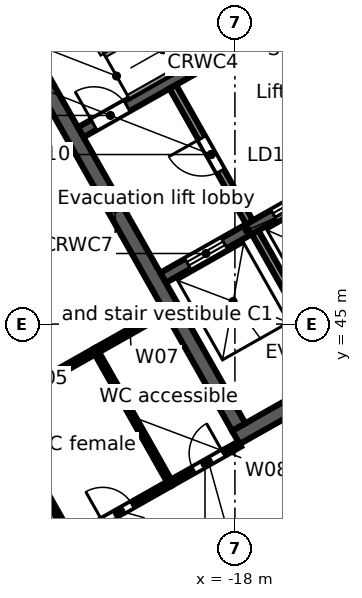
"""IFC4 building model, lengths in metres.
Left out: names, types, materials, properties, quantities, classifications, styles, units other than length and angle.
Written with IfcOpenShell. Run it as: python <this file> out.ifc"""

import sys

from ifc_helpers import new_model, si_unit, direction, frame, frame_2d, origin, place, context, subcontext, project, spatial, rectangle, extrude, element, fill, save


model = new_model("IFC4")
c1 = context("Model", 3, precision=1e-05, world=origin(), true_north=direction((0.0, 1.0)))
c2 = subcontext(c1, "Body", "Model", "MODEL_VIEW")
j1 = project(units=[si_unit("LENGTHUNIT", "METRE"), si_unit("PLANEANGLEUNIT", "RADIAN")], contexts=[c1])
p1 = place(None, origin())
s1 = spatial("IfcSite", under=j1, at=p1, CompositionType="ELEMENT")
p2 = place(p1, origin())
s2 = spatial("IfcBuilding", under=s1, at=p2, CompositionType="ELEMENT")
p3 = place(p2, frame((0.0, 0.0, 308.3)))
s3 = spatial("IfcBuildingStorey", under=s2, at=p3, CompositionType="ELEMENT", Elevation=308.3)
p4 = place(p3, frame((-58.732, 38.771, 0.0), z_axis=(0.0, 0.0, 1.0), x_axis=(0.870355615581, 0.492423702137, 0.0)))
e1 = element("IfcWall", 1, at=p4, inside=s3, PredefinedType="STANDARD", context=c2, shape_type="SweptSolid", body=[
    extrude(rectangle(XDim=64.052, YDim=0.25, at=frame_2d((32.026, 0.0))), origin(), (0.0, 0.0, 1.0), 3.45),
])
p5 = place(p4, frame((61.259, 0.0, 0.8)))
e2 = element("IfcOpeningElement", 2, at=p5, cuts=e1, PredefinedType="OPENING", context=c2, shape_type="SweptSolid", body=[
    extrude(rectangle(XDim=2.4, YDim=2.2, at=frame_2d((1.2, 1.1))), frame((0.0, 0.135, 0.0), z_axis=(0.0, -1.0, 0.0), x_axis=(1.0, 0.0, 0.0)), (0.0, 0.0, 1.0), 0.27),
])
p6 = place(p4, frame((58.216, 0.0, 0.8)))
e3 = element("IfcOpeningElement", 3, at=p6, cuts=e1, PredefinedType="OPENING", context=c2, shape_type="SweptSolid", body=[
    extrude(rectangle(XDim=2.4, YDim=2.2, at=frame_2d((1.2, 1.1))), frame((0.0, 0.135, 0.0), z_axis=(0.0, -1.0, 0.0), x_axis=(1.0, 0.0, 0.0)), (0.0, 0.0, 1.0), 0.27),
])
p7 = place(p4, frame((55.173, 0.0, 0.8)))
e4 = element("IfcOpeningElement", 4, at=p7, cuts=e1, PredefinedType="OPENING", context=c2, shape_type="SweptSolid", body=[
    extrude(rectangle(XDim=2.4, YDim=2.2, at=frame_2d((1.2, 1.1))), frame((0.0, 0.135, 0.0), z_axis=(0.0, -1.0, 0.0), x_axis=(1.0, 0.0, 0.0)), (0.0, 0.0, 1.0), 0.27),
])
p8 = place(p4, frame((52.129, 0.0, 0.8)))
e5 = element("IfcOpeningElement", 5, at=p8, cuts=e1, PredefinedType="OPENING", context=c2, shape_type="SweptSolid", body=[
    extrude(rectangle(XDim=2.4, YDim=2.2, at=frame_2d((1.2, 1.1))), frame((0.0, 0.135, 0.0), z_axis=(0.0, -1.0, 0.0), x_axis=(1.0, 0.0, 0.0)), (0.0, 0.0, 1.0), 0.27),
])
p9 = place(p4, frame((49.086, 0.0, 0.8)))
e6 = element("IfcOpeningElement", 6, at=p9, cuts=e1, PredefinedType="OPENING", context=c2, shape_type="SweptSolid", body=[
    extrude(rectangle(XDim=2.4, YDim=2.2, at=frame_2d((1.2, 1.1))), frame((0.0, 0.135, 0.0), z_axis=(0.0, -1.0, 0.0), x_axis=(1.0, 0.0, 0.0)), (0.0, 0.0, 1.0), 0.27),
])
p10 = place(p4, frame((46.043, 0.0, 0.8)))
e7 = element("IfcOpeningElement", 7, at=p10, cuts=e1, PredefinedType="OPENING", context=c2, shape_type="SweptSolid", body=[
    extrude(rectangle(XDim=2.4, YDim=2.2, at=frame_2d((1.2, 1.1))), frame((0.0, 0.135, 0.0), z_axis=(0.0, -1.0, 0.0), x_axis=(1.0, 0.0, 0.0)), (0.0, 0.0, 1.0), 0.27),
])
p11 = place(p4, frame((43.0, 0.0, 0.8)))
e8 = element("IfcOpeningElement", 8, at=p11, cuts=e1, PredefinedType="OPENING", context=c2, shape_type="SweptSolid", body=[
    extrude(rectangle(XDim=2.4, YDim=2.2, at=frame_2d((1.2, 1.1))), frame((0.0, 0.135, 0.0), z_axis=(0.0, -1.0, 0.0), x_axis=(1.0, 0.0, 0.0)), (0.0, 0.0, 1.0), 0.27),
])
p12 = place(p4, frame((39.956, 0.0, 0.8)))
e9 = element("IfcOpeningElement", 9, at=p12, cuts=e1, PredefinedType="OPENING", context=c2, shape_type="SweptSolid", body=[
    extrude(rectangle(XDim=2.4, YDim=2.2, at=frame_2d((1.2, 1.1))), frame((0.0, 0.135, 0.0), z_axis=(0.0, -1.0, 0.0), x_axis=(1.0, 0.0, 0.0)), (0.0, 0.0, 1.0), 0.27),
])
p13 = place(p4, frame((36.913, 0.0, 0.8)))
e10 = element("IfcOpeningElement", 10, at=p13, cuts=e1, PredefinedType="OPENING", context=c2, shape_type="SweptSolid", body=[
    extrude(rectangle(XDim=2.4, YDim=2.2, at=frame_2d((1.2, 1.1))), frame((0.0, 0.135, 0.0), z_axis=(0.0, -1.0, 0.0), x_axis=(1.0, 0.0, 0.0)), (0.0, 0.0, 1.0), 0.27),
])
p14 = place(p4, frame((33.87, 0.0, 0.8)))
e11 = element("IfcOpeningElement", 11, at=p14, cuts=e1, PredefinedType="OPENING", context=c2, shape_type="SweptSolid", body=[
    extrude(rectangle(XDim=2.4, YDim=2.2, at=frame_2d((1.2, 1.1))), frame((0.0, 0.135, 0.0), z_axis=(0.0, -1.0, 0.0), x_axis=(1.0, 0.0, 0.0)), (0.0, 0.0, 1.0), 0.27),
])
p15 = place(p4, frame((30.826, 0.0, 0.8)))
e12 = element("IfcOpeningElement", 12, at=p15, cuts=e1, PredefinedType="OPENING", context=c2, shape_type="SweptSolid", body=[
    extrude(rectangle(XDim=2.4, YDim=2.2, at=frame_2d((1.2, 1.1))), frame((0.0, 0.135, 0.0), z_axis=(0.0, -1.0, 0.0), x_axis=(1.0, 0.0, 0.0)), (0.0, 0.0, 1.0), 0.27),
])
p16 = place(p4, frame((27.783, 0.0, 0.8)))
e13 = element("IfcOpeningElement", 13, at=p16, cuts=e1, PredefinedType="OPENING", context=c2, shape_type="SweptSolid", body=[
    extrude(rectangle(XDim=2.4, YDim=2.2, at=frame_2d((1.2, 1.1))), frame((0.0, 0.135, 0.0), z_axis=(0.0, -1.0, 0.0), x_axis=(1.0, 0.0, 0.0)), (0.0, 0.0, 1.0), 0.27),
])
p17 = place(p4, frame((24.74, 0.0, 0.8)))
e14 = element("IfcOpeningElement", 14, at=p17, cuts=e1, PredefinedType="OPENING", context=c2, shape_type="SweptSolid", body=[
    extrude(rectangle(XDim=2.4, YDim=2.2, at=frame_2d((1.2, 1.1))), frame((0.0, 0.135, 0.0), z_axis=(0.0, -1.0, 0.0), x_axis=(1.0, 0.0, 0.0)), (0.0, 0.0, 1.0), 0.27),
])
p18 = place(p4, frame((21.696, 0.0, 0.8)))
e15 = element("IfcOpeningElement", 15, at=p18, cuts=e1, PredefinedType="OPENING", context=c2, shape_type="SweptSolid", body=[
    extrude(rectangle(XDim=2.4, YDim=2.2, at=frame_2d((1.2, 1.1))), frame((0.0, 0.135, 0.0), z_axis=(0.0, -1.0, 0.0), x_axis=(1.0, 0.0, 0.0)), (0.0, 0.0, 1.0), 0.27),
])
p19 = place(p4, frame((18.653, 0.0, 0.8)))
e16 = element("IfcOpeningElement", 16, at=p19, cuts=e1, PredefinedType="OPENING", context=c2, shape_type="SweptSolid", body=[
    extrude(rectangle(XDim=2.4, YDim=2.2, at=frame_2d((1.2, 1.1))), frame((0.0, 0.135, 0.0), z_axis=(0.0, -1.0, 0.0), x_axis=(1.0, 0.0, 0.0)), (0.0, 0.0, 1.0), 0.27),
])
p20 = place(p4, frame((15.61, 0.0, 0.8)))
e17 = element("IfcOpeningElement", 17, at=p20, cuts=e1, PredefinedType="OPENING", context=c2, shape_type="SweptSolid", body=[
    extrude(rectangle(XDim=2.4, YDim=2.2, at=frame_2d((1.2, 1.1))), frame((0.0, 0.135, 0.0), z_axis=(0.0, -1.0, 0.0), x_axis=(1.0, 0.0, 0.0)), (0.0, 0.0, 1.0), 0.27),
])
p21 = place(p4, frame((12.567, 0.0, 0.8)))
e18 = element("IfcOpeningElement", 18, at=p21, cuts=e1, PredefinedType="OPENING", context=c2, shape_type="SweptSolid", body=[
    extrude(rectangle(XDim=2.4, YDim=2.2, at=frame_2d((1.2, 1.1))), frame((0.0, 0.135, 0.0), z_axis=(0.0, -1.0, 0.0), x_axis=(1.0, 0.0, 0.0)), (0.0, 0.0, 1.0), 0.27),
])
p22 = place(p4, frame((9.523, 0.0, 0.8)))
e19 = element("IfcOpeningElement", 19, at=p22, cuts=e1, PredefinedType="OPENING", context=c2, shape_type="SweptSolid", body=[
    extrude(rectangle(XDim=2.4, YDim=2.2, at=frame_2d((1.2, 1.1))), frame((0.0, 0.135, 0.0), z_axis=(0.0, -1.0, 0.0), x_axis=(1.0, 0.0, 0.0)), (0.0, 0.0, 1.0), 0.27),
])
p23 = place(p4, frame((6.48, 0.0, 0.8)))
e20 = element("IfcOpeningElement", 20, at=p23, cuts=e1, PredefinedType="OPENING", context=c2, shape_type="SweptSolid", body=[
    extrude(rectangle(XDim=2.4, YDim=2.2, at=frame_2d((1.2, 1.1))), frame((0.0, 0.135, 0.0), z_axis=(0.0, -1.0, 0.0), x_axis=(1.0, 0.0, 0.0)), (0.0, 0.0, 1.0), 0.27),
])
p24 = place(p4, frame((3.437, 0.0, 0.8)))
e21 = element("IfcOpeningElement", 21, at=p24, cuts=e1, PredefinedType="OPENING", context=c2, shape_type="SweptSolid", body=[
    extrude(rectangle(XDim=2.4, YDim=2.2, at=frame_2d((1.2, 1.1))), frame((0.0, 0.135, 0.0), z_axis=(0.0, -1.0, 0.0), x_axis=(1.0, 0.0, 0.0)), (0.0, 0.0, 1.0), 0.27),
])
p25 = place(p4, frame((0.393, 0.0, 0.8)))
e22 = element("IfcOpeningElement", 22, at=p25, cuts=e1, PredefinedType="OPENING", context=c2, shape_type="SweptSolid", body=[
    extrude(rectangle(XDim=2.4, YDim=2.2, at=frame_2d((1.2, 1.1))), frame((0.0, 0.135, 0.0), z_axis=(0.0, -1.0, 0.0), x_axis=(1.0, 0.0, 0.0)), (0.0, 0.0, 1.0), 0.27),
])
p26 = place(p3, frame((-3.017, 46.293, 0.0), z_axis=(0.0, 0.0, 1.0), x_axis=(-0.870355474887, -0.492423950812, 0.0)))
e23 = element("IfcWall", 23, at=p26, inside=s3, PredefinedType="STANDARD", context=c2, shape_type="SweptSolid", body=[
    extrude(rectangle(XDim=40.34, YDim=0.25, at=frame_2d((20.17, 0.0))), origin(), (0.0, 0.0, 1.0), 3.45),
])
p27 = place(p26, frame((37.428, 0.0, 0.8)))
e24 = element("IfcOpeningElement", 24, at=p27, cuts=e23, PredefinedType="OPENING", context=c2, shape_type="SweptSolid", body=[
    extrude(rectangle(XDim=2.4, YDim=2.2, at=frame_2d((1.2, 1.1))), frame((0.0, 0.135, 0.0), z_axis=(0.0, -1.0, 0.0), x_axis=(1.0, 0.0, 0.0)), (0.0, 0.0, 1.0), 0.27),
])
p28 = place(p26, frame((34.372, 0.0, 0.0)))
e25 = element("IfcOpeningElement", 25, at=p28, cuts=e23, PredefinedType="OPENING", context=c2, shape_type="SweptSolid", body=[
    extrude(rectangle(XDim=1.8, YDim=2.4, at=frame_2d((0.9, 1.2))), frame((0.0, 0.135, 0.0), z_axis=(0.0, -1.0, 0.0), x_axis=(1.0, 0.0, 0.0)), (0.0, 0.0, 1.0), 0.27),
])
p29 = place(p26, frame((30.716, 0.0, 0.8)))
e26 = element("IfcOpeningElement", 26, at=p29, cuts=e23, PredefinedType="OPENING", context=c2, shape_type="SweptSolid", body=[
    extrude(rectangle(XDim=2.4, YDim=2.2, at=frame_2d((1.2, 1.1))), frame((0.0, 0.135, 0.0), z_axis=(0.0, -1.0, 0.0), x_axis=(1.0, 0.0, 0.0)), (0.0, 0.0, 1.0), 0.27),
])
p30 = place(p26, frame((27.36, 0.0, 0.8)))
e27 = element("IfcOpeningElement", 27, at=p30, cuts=e23, PredefinedType="OPENING", context=c2, shape_type="SweptSolid", body=[
    extrude(rectangle(XDim=2.4, YDim=2.2, at=frame_2d((1.2, 1.1))), frame((0.0, 0.135, 0.0), z_axis=(0.0, -1.0, 0.0), x_axis=(1.0, 0.0, 0.0)), (0.0, 0.0, 1.0), 0.27),
])
p31 = place(p26, frame((24.304, 0.0, 0.0)))
e28 = element("IfcOpeningElement", 28, at=p31, cuts=e23, PredefinedType="OPENING", context=c2, shape_type="SweptSolid", body=[
    extrude(rectangle(XDim=1.8, YDim=2.4, at=frame_2d((0.9, 1.2))), frame((0.0, 0.135, 0.0), z_axis=(0.0, -1.0, 0.0), x_axis=(1.0, 0.0, 0.0)), (0.0, 0.0, 1.0), 0.27),
])
p32 = place(p26, frame((20.648, 0.0, 0.8)))
e29 = element("IfcOpeningElement", 29, at=p32, cuts=e23, PredefinedType="OPENING", context=c2, shape_type="SweptSolid", body=[
    extrude(rectangle(XDim=2.4, YDim=2.2, at=frame_2d((1.2, 1.1))), frame((0.0, 0.135, 0.0), z_axis=(0.0, -1.0, 0.0), x_axis=(1.0, 0.0, 0.0)), (0.0, 0.0, 1.0), 0.27),
])
p33 = place(p26, frame((17.292, 0.0, 0.8)))
e30 = element("IfcOpeningElement", 30, at=p33, cuts=e23, PredefinedType="OPENING", context=c2, shape_type="SweptSolid", body=[
    extrude(rectangle(XDim=2.4, YDim=2.2, at=frame_2d((1.2, 1.1))), frame((0.0, 0.135, 0.0), z_axis=(0.0, -1.0, 0.0), x_axis=(1.0, 0.0, 0.0)), (0.0, 0.0, 1.0), 0.27),
])
p34 = place(p26, frame((14.236, 0.0, 0.0)))
e31 = element("IfcOpeningElement", 31, at=p34, cuts=e23, PredefinedType="OPENING", context=c2, shape_type="SweptSolid", body=[
    extrude(rectangle(XDim=1.8, YDim=2.4, at=frame_2d((0.9, 1.2))), frame((0.0, 0.135, 0.0), z_axis=(0.0, -1.0, 0.0), x_axis=(1.0, 0.0, 0.0)), (0.0, 0.0, 1.0), 0.27),
])
p35 = place(p26, frame((10.58, 0.0, 0.8)))
e32 = element("IfcOpeningElement", 32, at=p35, cuts=e23, PredefinedType="OPENING", context=c2, shape_type="SweptSolid", body=[
    extrude(rectangle(XDim=2.4, YDim=2.2, at=frame_2d((1.2, 1.1))), frame((0.0, 0.135, 0.0), z_axis=(0.0, -1.0, 0.0), x_axis=(1.0, 0.0, 0.0)), (0.0, 0.0, 1.0), 0.27),
])
p36 = place(p26, frame((7.224, 0.0, 0.8)))
e33 = element("IfcOpeningElement", 33, at=p36, cuts=e23, PredefinedType="OPENING", context=c2, shape_type="SweptSolid", body=[
    extrude(rectangle(XDim=2.4, YDim=2.2, at=frame_2d((1.2, 1.1))), frame((0.0, 0.135, 0.0), z_axis=(0.0, -1.0, 0.0), x_axis=(1.0, 0.0, 0.0)), (0.0, 0.0, 1.0), 0.27),
])
p37 = place(p26, frame((4.168, 0.0, 0.0)))
e34 = element("IfcOpeningElement", 34, at=p37, cuts=e23, PredefinedType="OPENING", context=c2, shape_type="SweptSolid", body=[
    extrude(rectangle(XDim=1.8, YDim=2.4, at=frame_2d((0.9, 1.2))), frame((0.0, 0.135, 0.0), z_axis=(0.0, -1.0, 0.0), x_axis=(1.0, 0.0, 0.0)), (0.0, 0.0, 1.0), 0.27),
])
p38 = place(p26, frame((0.512, 0.0, 0.8)))
e35 = element("IfcOpeningElement", 35, at=p38, cuts=e23, PredefinedType="OPENING", context=c2, shape_type="SweptSolid", body=[
    extrude(rectangle(XDim=2.4, YDim=2.2, at=frame_2d((1.2, 1.1))), frame((0.0, 0.135, 0.0), z_axis=(0.0, -1.0, 0.0), x_axis=(1.0, 0.0, 0.0)), (0.0, 0.0, 1.0), 0.27),
])
p39 = place(p3, frame((-17.975, 42.017, 0.0), z_axis=(0.0, 0.0, 1.0), x_axis=(0.87034965173, 0.492434243055, 0.0)))
e36 = element("IfcWall", 36, at=p39, inside=s3, PredefinedType="SOLIDWALL", context=c2, shape_type="SweptSolid", body=[
    extrude(rectangle(XDim=15.0, YDim=0.4, at=frame_2d((7.5, 0.0))), origin(), (0.0, 0.0, 1.0), 3.45),
])
p40 = place(p39, frame((6.1, 0.0, 0.0)))
e37 = element("IfcOpeningElement", 37, at=p40, cuts=e36, PredefinedType="OPENING", context=c2, shape_type="SweptSolid", body=[
    extrude(rectangle(XDim=1.2, YDim=2.1, at=frame_2d((0.6, 1.05))), frame((0.0, 0.21, 0.0), z_axis=(0.0, -1.0, 0.0), x_axis=(1.0, 0.0, 0.0)), (0.0, 0.0, 1.0), 0.42),
])
p41 = place(p3, frame((-19.892, 46.218, 0.0), z_axis=(0.0, 0.0, 1.0), x_axis=(0.870341639186, 0.492448404505, 0.0)))
e38 = element("IfcWall", 38, at=p41, inside=s3, PredefinedType="SOLIDWALL", context=c2, shape_type="SweptSolid", body=[
    extrude(rectangle(XDim=5.1, YDim=0.3, at=frame_2d((2.55, 0.0))), origin(), (0.0, 0.0, 1.0), 3.45),
])
p42 = place(p41, frame((0.75, 0.0, 0.0)))
e39 = element("IfcOpeningElement", 39, at=p42, cuts=e38, PredefinedType="OPENING", context=c2, shape_type="SweptSolid", body=[
    extrude(rectangle(XDim=1.1, YDim=2.1, at=frame_2d((0.55, 1.05))), frame((0.0, 0.16, 0.0), z_axis=(0.0, -1.0, 0.0), x_axis=(1.0, 0.0, 0.0)), (0.0, 0.0, 1.0), 0.32),
])
p43 = place(p41, frame((3.35, 0.0, 0.0)))
e40 = element("IfcOpeningElement", 40, at=p43, cuts=e38, PredefinedType="OPENING", context=c2, shape_type="SweptSolid", body=[
    extrude(rectangle(XDim=1.1, YDim=2.1, at=frame_2d((0.55, 1.05))), frame((0.0, 0.16, 0.0), z_axis=(0.0, -1.0, 0.0), x_axis=(1.0, 0.0, 0.0)), (0.0, 0.0, 1.0), 0.32),
])
p44 = place(p3, frame((-22.059, 50.047, 0.0), z_axis=(0.0, 0.0, 1.0), x_axis=(0.87035077051, 0.49243226567, 0.0)))
e41 = element("IfcWall", 41, at=p44, inside=s3, PredefinedType="SOLIDWALL", context=c2, shape_type="SweptSolid", body=[
    extrude(rectangle(XDim=7.4, YDim=0.3, at=frame_2d((3.7, 0.0))), origin(), (0.0, 0.0, 1.0), 3.45),
])
p45 = place(p44, frame((0.4, 0.0, 0.0)))
e42 = element("IfcOpeningElement", 42, at=p45, cuts=e41, PredefinedType="OPENING", context=c2, shape_type="SweptSolid", body=[
    extrude(rectangle(XDim=1.0, YDim=2.1, at=frame_2d((0.5, 1.05))), frame((0.0, 0.16, 0.0), z_axis=(0.0, -1.0, 0.0), x_axis=(1.0, 0.0, 0.0)), (0.0, 0.0, 1.0), 0.32),
])
p46 = place(p3, frame((-24.4, 53.779, 0.0), z_axis=(0.0, 0.0, 1.0), x_axis=(0.492421663121, -0.870356769198, 0.0)))
e43 = element("IfcWall", 43, at=p46, inside=s3, PredefinedType="SOLIDWALL", context=c2, shape_type="SweptSolid", body=[
    extrude(rectangle(XDim=13.2, YDim=0.4, at=frame_2d((6.6, 0.0))), origin(), (0.0, 0.0, 1.0), 3.45),
])
p47 = place(p3, frame((-17.469, 47.417, 0.0), z_axis=(0.0, 0.0, 1.0), x_axis=(0.492466057713, -0.870331650579, 0.0)))
e44 = element("IfcWall", 44, at=p47, inside=s3, PredefinedType="SOLIDWALL", context=c2, shape_type="SweptSolid", body=[
    extrude(rectangle(XDim=4.25, YDim=0.2, at=frame_2d((2.125, 0.0))), origin(), (0.0, 0.0, 1.0), 3.45),
])
p48 = place(p3, frame((-19.635, 51.246, 0.0), z_axis=(0.0, 0.0, 1.0), x_axis=(0.492408451753, -0.87036424366, 0.0)))
e45 = element("IfcWall", 45, at=p48, inside=s3, PredefinedType="PARTITIONING", context=c2, shape_type="SweptSolid", body=[
    extrude(rectangle(XDim=4.1, YDim=0.2, at=frame_2d((2.05, 0.0))), origin(), (0.0, 0.0, 1.0), 3.45),
])
p49 = place(p48, frame((1.55, 0.0, 0.0)))
e46 = element("IfcOpeningElement", 46, at=p49, cuts=e45, PredefinedType="OPENING", context=c2, shape_type="SweptSolid", body=[
    extrude(rectangle(XDim=1.0, YDim=2.1, at=frame_2d((0.5, 1.05))), frame((0.0, 0.11, 0.0), z_axis=(0.0, -1.0, 0.0), x_axis=(1.0, 0.0, 0.0)), (0.0, 0.0, 1.0), 0.22),
])
p50 = place(p3, frame((-24.277, 42.818, 0.0), z_axis=(0.0, 0.0, 1.0), x_axis=(0.492210087366, -0.870476438449, 0.0)))
e47 = element("IfcWall", 47, at=p50, inside=s3, PredefinedType="PARTITIONING", context=c2, shape_type="SweptSolid", body=[
    extrude(rectangle(XDim=4.0, YDim=0.125, at=frame_2d((2.0, 0.0))), origin(), (0.0, 0.0, 1.0), 3.45),
])
p51 = place(p3, frame((-24.277, 42.818, 0.0), z_axis=(0.0, 0.0, 1.0), x_axis=(0.870423351516, 0.492303960105, 0.0)))
e48 = element("IfcWall", 48, at=p51, inside=s3, PredefinedType="PARTITIONING", context=c2, shape_type="SweptSolid", body=[
    extrude(rectangle(XDim=3.0, YDim=0.15, at=frame_2d((1.5, 0.0))), origin(), (0.0, 0.0, 1.0), 3.45),
])
p52 = place(p3, frame((-22.308, 39.336, 0.0), z_axis=(0.0, 0.0, 1.0), x_axis=(0.870248957119, 0.492612172641, 0.0)))
e49 = element("IfcWall", 49, at=p52, inside=s3, PredefinedType="PARTITIONING", context=c2, shape_type="SweptSolid", body=[
    extrude(rectangle(XDim=3.0, YDim=0.15, at=frame_2d((1.5, 0.0))), origin(), (0.0, 0.0, 1.0), 3.45),
])
p53 = place(p52, frame((0.95, 0.0, 0.0)))
e50 = element("IfcOpeningElement", 50, at=p53, cuts=e49, PredefinedType="OPENING", context=c2, shape_type="SweptSolid", body=[
    extrude(rectangle(XDim=0.9, YDim=2.1, at=frame_2d((0.45, 1.05))), frame((0.0, 0.085, 0.0), z_axis=(0.0, -1.0, 0.0), x_axis=(1.0, 0.0, 0.0)), (0.0, 0.0, 1.0), 0.17),
])
p54 = place(p3, frame((-21.666, 44.295, 0.0), z_axis=(0.0, 0.0, 1.0), x_axis=(0.870297454631, 0.492526487067, 0.0)))
e51 = element("IfcWall", 51, at=p54, inside=s3, PredefinedType="PARTITIONING", context=c2, shape_type="SweptSolid", body=[
    extrude(rectangle(XDim=2.091, YDim=0.15, at=frame_2d((1.046, 0.0))), origin(), (0.0, 0.0, 1.0), 3.45),
])
p55 = place(p3, frame((-21.666, 44.295, 0.0), z_axis=(0.0, 0.0, 1.0), x_axis=(0.492340861121, -0.870402479587, 0.0)))
e52 = element("IfcWall", 52, at=p55, inside=s3, PredefinedType="PARTITIONING", context=c2, shape_type="SweptSolid", body=[
    extrude(rectangle(XDim=3.999, YDim=0.125, at=frame_2d((2.0, 0.0))), origin(), (0.0, 0.0, 1.0), 3.45),
])
p56 = place(p3, frame((-19.697, 40.814, 0.0), z_axis=(0.0, 0.0, 1.0), x_axis=(0.870497588791, 0.492172680986, 0.0)))
e53 = element("IfcWall", 53, at=p56, inside=s3, PredefinedType="PARTITIONING", context=c2, shape_type="SweptSolid", body=[
    extrude(rectangle(XDim=2.091, YDim=0.15, at=frame_2d((1.045, 0.0))), origin(), (0.0, 0.0, 1.0), 3.45),
])
p57 = place(p56, frame((0.7, 0.0, 0.0)))
e54 = element("IfcOpeningElement", 54, at=p57, cuts=e53, PredefinedType="OPENING", context=c2, shape_type="SweptSolid", body=[
    extrude(rectangle(XDim=0.9, YDim=2.1, at=frame_2d((0.45, 1.05))), frame((0.0, 0.085, 0.0), z_axis=(0.0, -1.0, 0.0), x_axis=(1.0, 0.0, 0.0)), (0.0, 0.0, 1.0), 0.17),
])
p58 = place(p42, origin())
e55 = element("IfcDoor", 55, at=p58, inside=s3, OperationType="DOUBLE_DOOR_SLIDING", PredefinedType="DOOR", context=c2, shape_type="SweptSolid", body=[
    extrude(rectangle(XDim=1.1, YDim=2.1, at=frame_2d((0.55, 1.05))), frame((0.0, 0.025, 0.0), z_axis=(0.0, -1.0, 0.0), x_axis=(1.0, 0.0, 0.0)), (0.0, 0.0, 1.0), 0.05),
])
fill(e39, e55)
p59 = place(p43, origin())
e56 = element("IfcDoor", 56, at=p59, inside=s3, OperationType="DOUBLE_DOOR_SLIDING", PredefinedType="DOOR", context=c2, shape_type="SweptSolid", body=[
    extrude(rectangle(XDim=1.1, YDim=2.1, at=frame_2d((0.55, 1.05))), frame((0.0, 0.025, 0.0), z_axis=(0.0, -1.0, 0.0), x_axis=(1.0, 0.0, 0.0)), (0.0, 0.0, 1.0), 0.05),
])
fill(e40, e56)
p60 = place(p45, origin())
e57 = element("IfcDoor", 57, at=p60, inside=s3, OperationType="SINGLE_SWING_LEFT", PredefinedType="DOOR", context=c2, shape_type="SweptSolid", body=[
    extrude(rectangle(XDim=1.0, YDim=2.1, at=frame_2d((0.5, 1.05))), frame((0.0, 0.025, 0.0), z_axis=(0.0, -1.0, 0.0), x_axis=(1.0, 0.0, 0.0)), (0.0, 0.0, 1.0), 0.05),
])
fill(e42, e57)
p61 = place(p49, frame((1.0, 0.0, 0.0), z_axis=(0.0, 0.0, 1.0), x_axis=(-1.0, 0.0, 0.0)))
e58 = element("IfcDoor", 58, at=p61, inside=s3, OperationType="SINGLE_SWING_RIGHT", PredefinedType="DOOR", context=c2, shape_type="SweptSolid", body=[
    extrude(rectangle(XDim=1.0, YDim=2.1, at=frame_2d((0.5, 1.05))), frame((0.0, 0.025, 0.0), z_axis=(0.0, -1.0, 0.0), x_axis=(1.0, 0.0, 0.0)), (0.0, 0.0, 1.0), 0.05),
])
fill(e46, e58)
p62 = place(p53, origin())
e59 = element("IfcDoor", 59, at=p62, inside=s3, OperationType="SINGLE_SWING_LEFT", PredefinedType="DOOR", context=c2, shape_type="SweptSolid", body=[
    extrude(rectangle(XDim=0.9, YDim=2.1, at=frame_2d((0.45, 1.05))), frame((0.0, 0.025, 0.0), z_axis=(0.0, -1.0, 0.0), x_axis=(1.0, 0.0, 0.0)), (0.0, 0.0, 1.0), 0.05),
])
fill(e50, e59)
p63 = place(p57, origin())
e60 = element("IfcDoor", 60, at=p63, inside=s3, OperationType="SINGLE_SWING_RIGHT", PredefinedType="DOOR", context=c2, shape_type="SweptSolid", body=[
    extrude(rectangle(XDim=0.9, YDim=2.1, at=frame_2d((0.45, 1.05))), frame((0.0, 0.025, 0.0), z_axis=(0.0, -1.0, 0.0), x_axis=(1.0, 0.0, 0.0)), (0.0, 0.0, 1.0), 0.05),
])
fill(e54, e60)
save(model, sys.argv[1])
